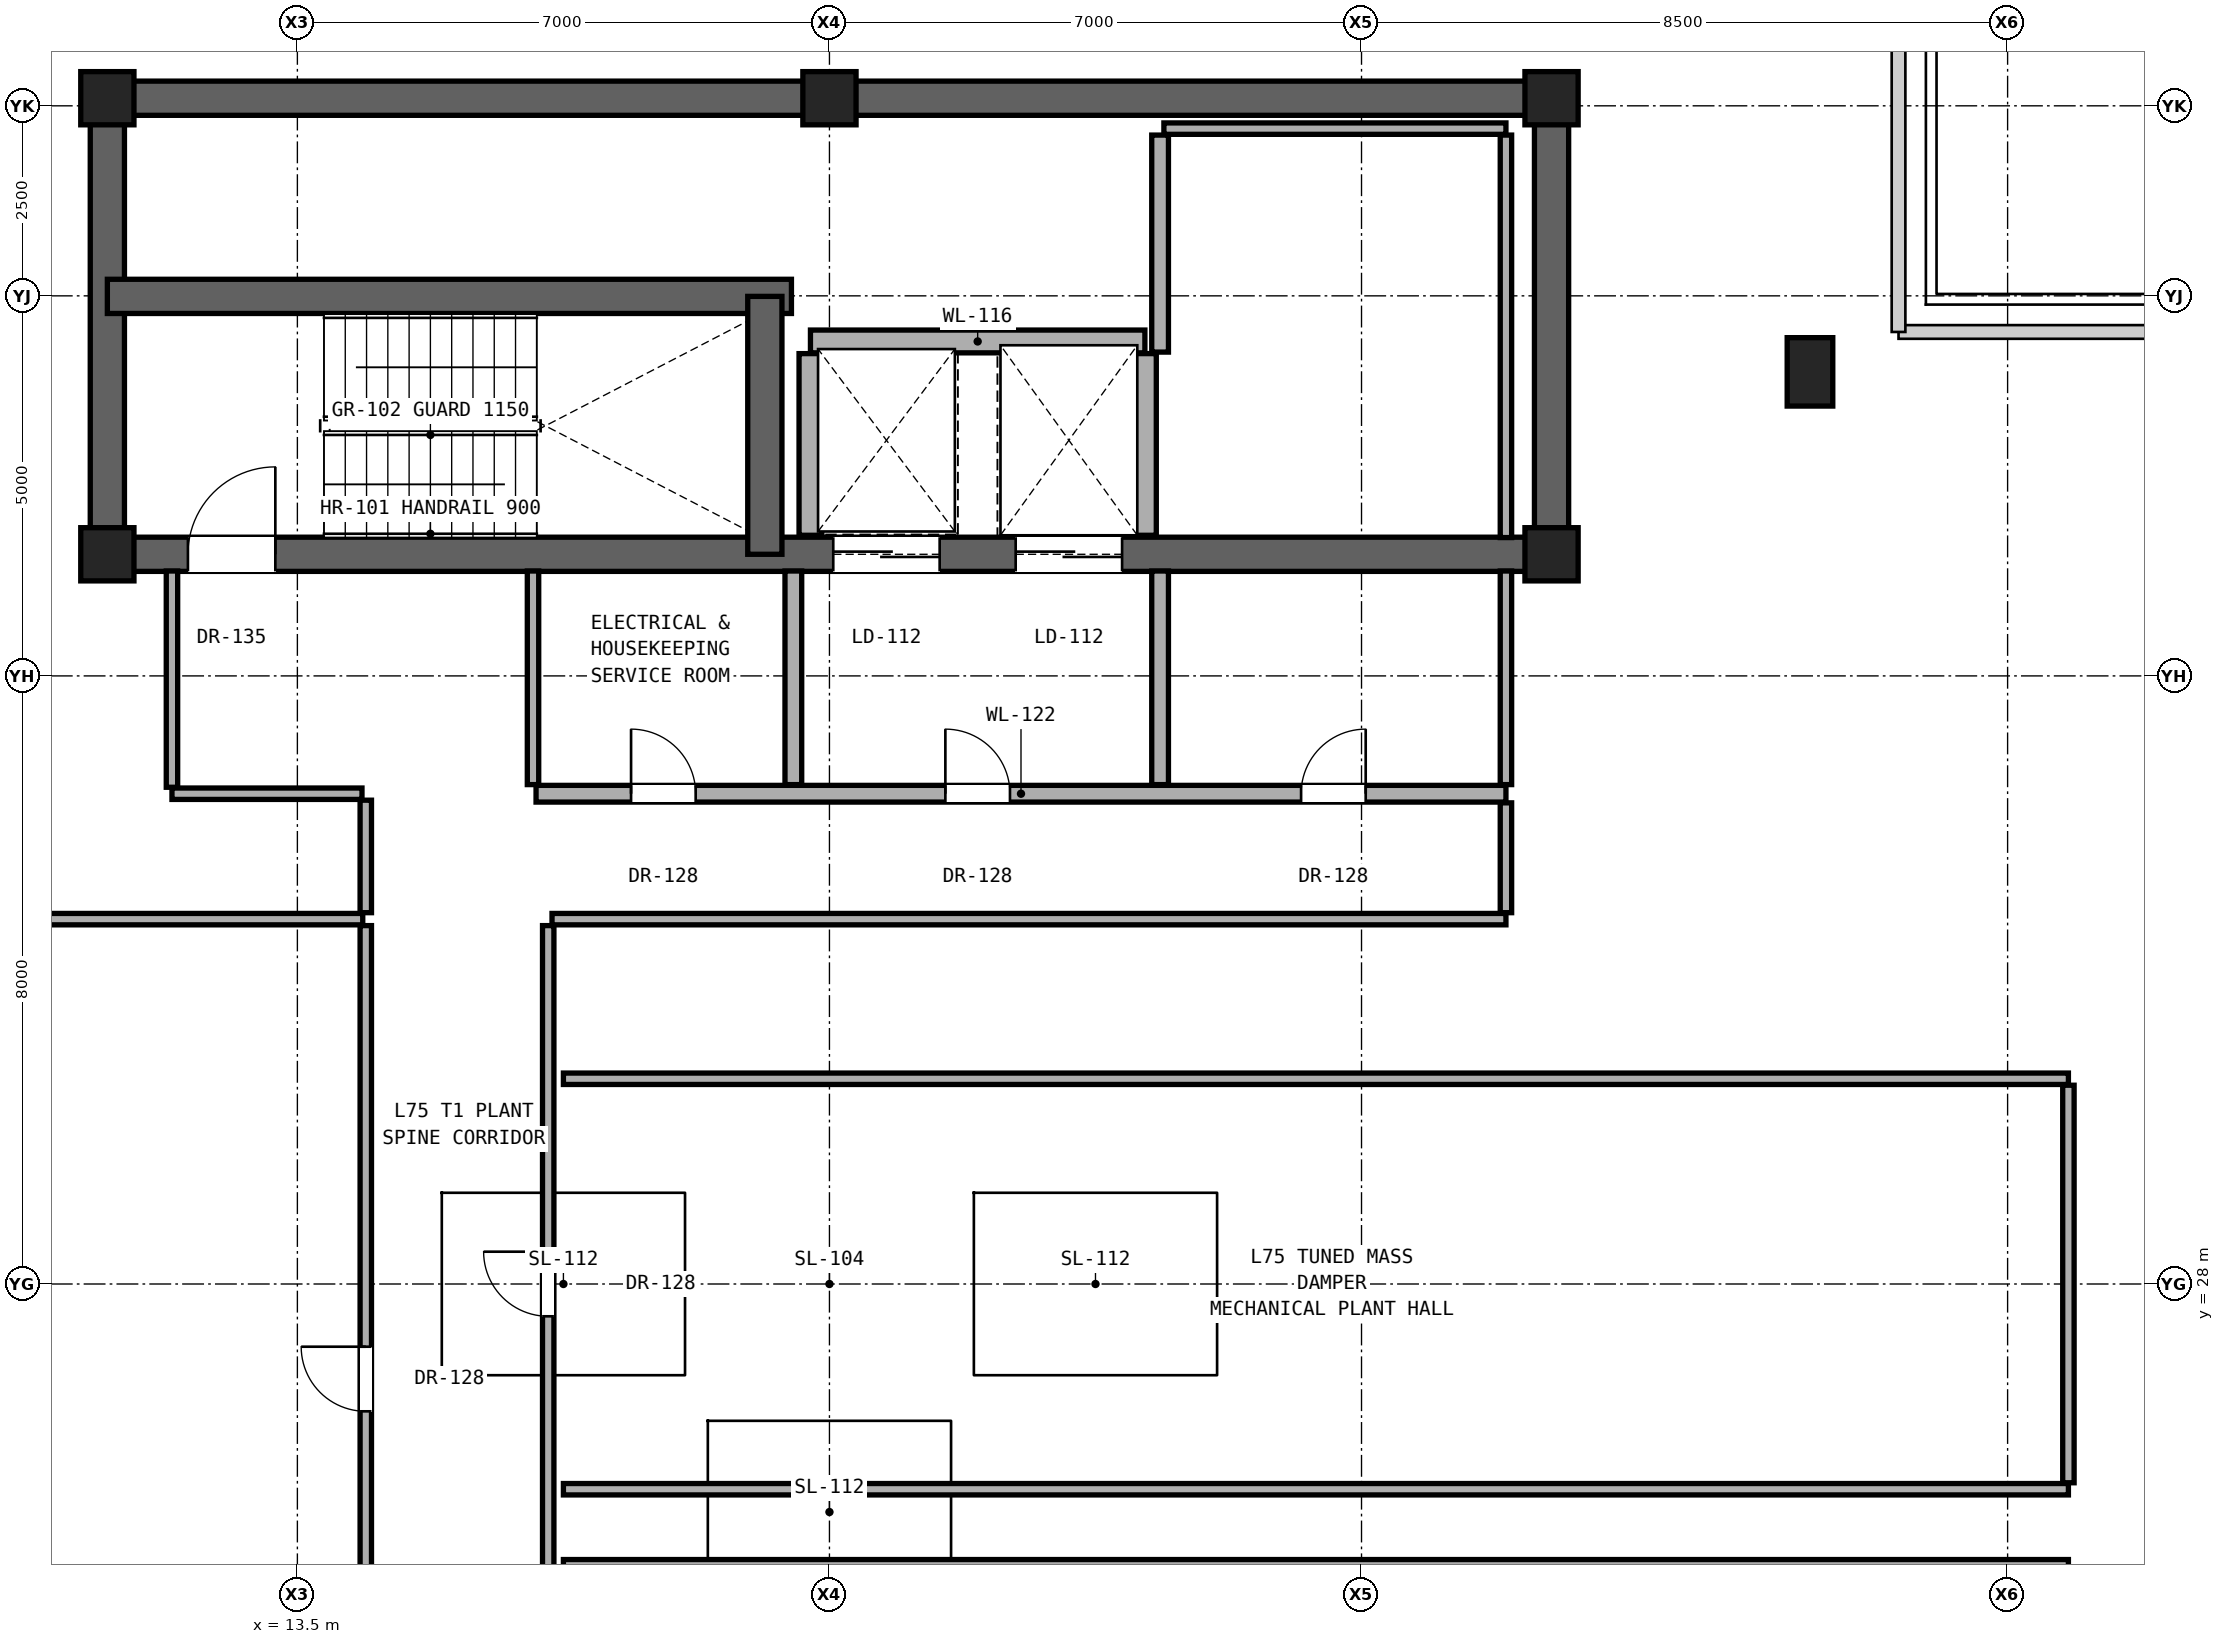
"""IFC4 building model, lengths in metres.
Left out: names, types, materials, properties, quantities, classifications, styles, units other than length and angle.
Written with IfcOpenShell. Run it as: python <this file> out.ifc"""

import sys

from ifc_helpers import new_model, si_unit, direction, frame, frame_2d, origin, origin_2d, place, context, subcontext, project, spatial, rectangle, extrude, element, fill, save


model = new_model("IFC4")
c1 = context("Model", 3, precision=1e-05, world=origin(), true_north=direction((0.0, 1.0)))
c2 = subcontext(c1, "Body", "Model", "MODEL_VIEW")
j1 = project(units=[si_unit("LENGTHUNIT", "METRE"), si_unit("PLANEANGLEUNIT", "RADIAN")], contexts=[c1])
p1 = place(None, origin())
s1 = spatial("IfcSite", under=j1, at=p1, CompositionType="ELEMENT")
p2 = place(p1, origin())
s2 = spatial("IfcBuilding", under=s1, at=p2, CompositionType="ELEMENT")
p3 = place(p2, frame((0.0, 0.0, 263.5)))
s3 = spatial("IfcBuildingStorey", under=s2, at=p3, CompositionType="ELEMENT", Elevation=263.5)
for number, where, z_axis, x_axis in (
    (1, (11.0, 37.6, 0.0), (0.0, 0.0, 1.0), (1.0, 0.0, 0.0)),
    (2, (30.0, 37.6, 0.0), (0.0, 0.0, 1.0), (1.0, 0.0, 0.0)),
    (3, (11.0, 43.6, 0.0), (0.0, 0.0, 1.0), (1.0, 0.0, 0.0)),
    (4, (20.5, 43.6, 0.0), (0.0, 0.0, 1.0), (1.0, 0.0, 0.0)),
    (5, (30.0, 43.6, 0.0), (0.0, 0.0, 1.0), (1.0, 0.0, 0.0)),
):
    element("IfcColumn", number, at=place(p3, frame(where, z_axis=z_axis, x_axis=x_axis)), inside=s3, PredefinedType="COLUMN", context=c2, shape_type="SweptSolid", body=[
        extrude(rectangle(XDim=0.7, YDim=0.7, at=origin_2d()), origin(), (0.0, 0.0, 1.0), 2.6),
    ])
p4 = place(p3, frame((33.4, 40.0, 0.0), z_axis=(0.0, 0.0, 1.0), x_axis=(1.0, 0.0, 0.0)))
e6 = element("IfcColumn", 6, at=p4, inside=s3, PredefinedType="PILASTER", context=c2, shape_type="SweptSolid", body=[
    extrude(rectangle(XDim=0.6, YDim=0.9, at=origin_2d()), origin(), (0.0, 0.0, 1.0), 2.6),
])
p5 = place(p3, frame((11.0, 43.6, 0.0), z_axis=(0.0, 0.0, 1.0), x_axis=(1.0, 0.0, 0.0)))
e7 = element("IfcWall", 7, at=p5, inside=s3, PredefinedType="SHEAR", context=c2, shape_type="SweptSolid", body=[
    extrude(rectangle(XDim=19.0, YDim=0.45, at=frame_2d((9.5, 0.0))), origin(), (0.0, 0.0, 1.0), 2.38),
])
for number, where, z_axis, x_axis in (
    (8, (11.0, 37.6, 0.0), (0.0, 0.0, 1.0), (0.0, 1.0, 0.0)),
    (9, (30.0, 37.6, 0.0), (0.0, 0.0, 1.0), (0.0, 1.0, 0.0)),
):
    element("IfcWall", number, at=place(p3, frame(where, z_axis=z_axis, x_axis=x_axis)), inside=s3, PredefinedType="SHEAR", context=c2, shape_type="SweptSolid", body=[
        extrude(rectangle(XDim=6.0, YDim=0.45, at=frame_2d((3.0, 0.0))), origin(), (0.0, 0.0, 1.0), 2.38),
    ])
p6 = place(p3, frame((11.0, 37.6, 0.0), z_axis=(0.0, 0.0, 1.0), x_axis=(1.0, 0.0, 0.0)))
e10 = element("IfcWall", 10, at=p6, inside=s3, PredefinedType="SHEAR", context=c2, shape_type="SweptSolid", body=[
    extrude(rectangle(XDim=19.0, YDim=0.45, at=frame_2d((9.5, 0.0))), origin(), (0.0, 0.0, 1.0), 2.38),
])
p7 = place(p6, frame((1.06, 0.0, 0.0)))
e11 = element("IfcOpeningElement", 11, at=p7, cuts=e10, PredefinedType="OPENING", context=c2, shape_type="SweptSolid", body=[
    extrude(rectangle(XDim=1.15, YDim=2.2, at=frame_2d((0.575, 1.1))), frame((0.0, 0.235, 0.0), z_axis=(0.0, -1.0, 0.0), x_axis=(1.0, 0.0, 0.0)), (0.0, 0.0, 1.0), 0.47),
])
p8 = place(p6, frame((9.55, 0.0, 0.0)))
e12 = element("IfcOpeningElement", 12, at=p8, cuts=e10, PredefinedType="OPENING", context=c2, shape_type="SweptSolid", body=[
    extrude(rectangle(XDim=1.4, YDim=2.35, at=frame_2d((0.7, 1.175))), frame((0.0, 0.235, 0.0), z_axis=(0.0, -1.0, 0.0), x_axis=(1.0, 0.0, 0.0)), (0.0, 0.0, 1.0), 0.47),
])
p9 = place(p6, frame((11.95, 0.0, 0.0)))
e13 = element("IfcOpeningElement", 13, at=p9, cuts=e10, PredefinedType="OPENING", context=c2, shape_type="SweptSolid", body=[
    extrude(rectangle(XDim=1.4, YDim=2.35, at=frame_2d((0.7, 1.175))), frame((0.0, 0.235, 0.0), z_axis=(0.0, -1.0, 0.0), x_axis=(1.0, 0.0, 0.0)), (0.0, 0.0, 1.0), 0.47),
])
p10 = place(p3, frame((11.0, 40.993, 0.0), z_axis=(0.0, 0.0, 1.0), x_axis=(1.0, 0.0, 0.0)))
e14 = element("IfcWall", 14, at=p10, inside=s3, PredefinedType="SHEAR", context=c2, shape_type="SweptSolid", body=[
    extrude(rectangle(XDim=9.0, YDim=0.45, at=frame_2d((4.5, 0.0))), origin(), (0.0, 0.0, 1.0), 2.38),
])
p11 = place(p3, frame((19.65, 37.6, 0.0), z_axis=(0.0, 0.0, 1.0), x_axis=(0.0, 1.0, 0.0)))
e15 = element("IfcWall", 15, at=p11, inside=s3, PredefinedType="SHEAR", context=c2, shape_type="SweptSolid", body=[
    extrude(rectangle(XDim=3.393, YDim=0.45, at=frame_2d((1.696, 0.0))), origin(), (0.0, 0.0, 1.0), 2.38),
])
for number, where, z_axis, x_axis in (
    (16, (17.0, 24.3, 0.0), (0.0, 0.0, 1.0), (1.0, 0.0, 0.0)),
    (17, (17.0, 25.3, 0.0), (0.0, 0.0, 1.0), (1.0, 0.0, 0.0)),
    (18, (17.0, 30.7, 0.0), (0.0, 0.0, 1.0), (1.0, 0.0, 0.0)),
):
    element("IfcWall", number, at=place(p3, frame(where, z_axis=z_axis, x_axis=x_axis)), inside=s3, PredefinedType="PARTITIONING", context=c2, shape_type="SweptSolid", body=[
        extrude(rectangle(XDim=19.8, YDim=0.15, at=frame_2d((9.9, 0.0))), origin(), (0.0, 0.0, 1.0), 2.042),
    ])
p12 = place(p3, frame((3.2, 32.8, 0.0), z_axis=(0.0, 0.0, 1.0), x_axis=(1.0, 0.0, 0.0)))
e19 = element("IfcWall", 19, at=p12, inside=s3, PredefinedType="PARTITIONING", context=c2, shape_type="SweptSolid", body=[
    extrude(rectangle(XDim=11.16, YDim=0.15, at=frame_2d((5.58, 0.0))), origin(), (0.0, 0.0, 1.0), 2.042),
])
p13 = place(p3, frame((16.85, 32.8, 0.0), z_axis=(0.0, 0.0, 1.0), x_axis=(1.0, 0.0, 0.0)))
e20 = element("IfcWall", 20, at=p13, inside=s3, PredefinedType="PARTITIONING", context=c2, shape_type="SweptSolid", body=[
    extrude(rectangle(XDim=12.55, YDim=0.15, at=frame_2d((6.275, 0.0))), origin(), (0.0, 0.0, 1.0), 2.042),
])
p14 = place(p3, frame((11.85, 34.45, 0.0), z_axis=(0.0, 0.0, 1.0), x_axis=(1.0, 0.0, 0.0)))
e21 = element("IfcWall", 21, at=p14, inside=s3, PredefinedType="PARTITIONING", context=c2, shape_type="SweptSolid", body=[
    extrude(rectangle(XDim=2.5, YDim=0.15, at=frame_2d((1.25, 0.0))), origin(), (0.0, 0.0, 1.0), 2.38),
])
p15 = place(p3, frame((16.64, 34.45, 0.0), z_axis=(0.0, 0.0, 1.0), x_axis=(1.0, 0.0, 0.0)))
e22 = element("IfcWall", 22, at=p15, inside=s3, PredefinedType="SOLIDWALL", context=c2, shape_type="SweptSolid", body=[
    extrude(rectangle(XDim=12.76, YDim=0.22, at=frame_2d((6.38, 0.0))), origin(), (0.0, 0.0, 1.0), 2.042),
])
p16 = place(p15, frame((5.385, 0.0, 0.0)))
e23 = element("IfcOpeningElement", 23, at=p16, cuts=e22, PredefinedType="OPENING", context=c2, shape_type="SweptSolid", body=[
    extrude(rectangle(XDim=0.85, YDim=2.01, at=frame_2d((0.425, 1.005))), frame((0.0, 0.12, 0.0), z_axis=(0.0, -1.0, 0.0), x_axis=(1.0, 0.0, 0.0)), (0.0, 0.0, 1.0), 0.24),
])
p17 = place(p15, frame((10.065, 0.0, 0.0)))
e24 = element("IfcOpeningElement", 24, at=p17, cuts=e22, PredefinedType="OPENING", context=c2, shape_type="SweptSolid", body=[
    extrude(rectangle(XDim=0.85, YDim=2.01, at=frame_2d((0.425, 1.005))), frame((0.0, 0.12, 0.0), z_axis=(0.0, -1.0, 0.0), x_axis=(1.0, 0.0, 0.0)), (0.0, 0.0, 1.0), 0.24),
])
p18 = place(p15, frame((1.25, 0.0, 0.0)))
e25 = element("IfcOpeningElement", 25, at=p18, cuts=e22, PredefinedType="OPENING", context=c2, shape_type="SweptSolid", body=[
    extrude(rectangle(XDim=0.85, YDim=2.01, at=frame_2d((0.425, 1.005))), frame((0.0, 0.12, 0.0), z_axis=(0.0, -1.0, 0.0), x_axis=(1.0, 0.0, 0.0)), (0.0, 0.0, 1.0), 0.24),
])
p19 = place(p3, frame((20.25, 40.4, 0.0), z_axis=(0.0, 0.0, 1.0), x_axis=(1.0, 0.0, 0.0)))
e26 = element("IfcWall", 26, at=p19, inside=s3, PredefinedType="SOLIDWALL", context=c2, shape_type="SweptSolid", body=[
    extrude(rectangle(XDim=4.4, YDim=0.3, at=frame_2d((2.2, 0.0))), origin(), (0.0, 0.0, 1.0), 2.38),
])
p20 = place(p3, frame((24.9, 43.2, 0.0), z_axis=(0.0, 0.0, 1.0), x_axis=(1.0, 0.0, 0.0)))
e27 = element("IfcWall", 27, at=p20, inside=s3, PredefinedType="PARTITIONING", context=c2, shape_type="SweptSolid", body=[
    extrude(rectangle(XDim=4.5, YDim=0.15, at=frame_2d((2.25, 0.0))), origin(), (0.0, 0.0, 1.0), 2.38),
])
p21 = place(p3, frame((11.85, 34.535, 0.0), z_axis=(0.0, 0.0, 1.0), x_axis=(0.0, 1.0, 0.0)))
e28 = element("IfcWall", 28, at=p21, inside=s3, PredefinedType="PARTITIONING", context=c2, shape_type="SweptSolid", body=[
    extrude(rectangle(XDim=2.845, YDim=0.15, at=frame_2d((1.422, 0.0))), origin(), (0.0, 0.0, 1.0), 2.38),
])
p22 = place(p3, frame((14.4, 20.785, 0.0), z_axis=(0.0, 0.0, 1.0), x_axis=(0.0, 1.0, 0.0)))
e29 = element("IfcWall", 29, at=p22, inside=s3, PredefinedType="PARTITIONING", context=c2, shape_type="SweptSolid", body=[
    extrude(rectangle(XDim=11.93, YDim=0.15, at=frame_2d((5.965, 0.0))), origin(), (0.0, 0.0, 1.0), 2.042),
])
p23 = place(p22, frame((5.54, 0.0, 0.0)))
e30 = element("IfcOpeningElement", 30, at=p23, cuts=e29, PredefinedType="OPENING", context=c2, shape_type="SweptSolid", body=[
    extrude(rectangle(XDim=0.85, YDim=2.01, at=frame_2d((0.425, 1.005))), frame((0.0, 0.085, 0.0), z_axis=(0.0, -1.0, 0.0), x_axis=(1.0, 0.0, 0.0)), (0.0, 0.0, 1.0), 0.17),
])
p24 = place(p3, frame((14.4, 32.885, 0.0), z_axis=(0.0, 0.0, 1.0), x_axis=(0.0, 1.0, 0.0)))
e31 = element("IfcWall", 31, at=p24, inside=s3, PredefinedType="PARTITIONING", context=c2, shape_type="SweptSolid", body=[
    extrude(rectangle(XDim=1.48, YDim=0.15, at=frame_2d((0.74, 0.0))), origin(), (0.0, 0.0, 1.0), 2.38),
])
p25 = place(p3, frame((16.6, 34.57, 0.0), z_axis=(0.0, 0.0, 1.0), x_axis=(0.0, 1.0, 0.0)))
e32 = element("IfcWall", 32, at=p25, inside=s3, PredefinedType="PARTITIONING", context=c2, shape_type="SweptSolid", body=[
    extrude(rectangle(XDim=2.81, YDim=0.15, at=frame_2d((1.405, 0.0))), origin(), (0.0, 0.0, 1.0), 2.38),
])
p26 = place(p3, frame((16.8, 20.785, 0.0), z_axis=(0.0, 0.0, 1.0), x_axis=(0.0, 1.0, 0.0)))
e33 = element("IfcWall", 33, at=p26, inside=s3, PredefinedType="PARTITIONING", context=c2, shape_type="SweptSolid", body=[
    extrude(rectangle(XDim=11.93, YDim=0.15, at=frame_2d((5.965, 0.0))), origin(), (0.0, 0.0, 1.0), 2.042),
])
p27 = place(p26, frame((6.79, 0.0, 0.0)))
e34 = element("IfcOpeningElement", 34, at=p27, cuts=e33, PredefinedType="OPENING", context=c2, shape_type="SweptSolid", body=[
    extrude(rectangle(XDim=0.85, YDim=2.01, at=frame_2d((0.425, 1.005))), frame((0.0, 0.085, 0.0), z_axis=(0.0, -1.0, 0.0), x_axis=(1.0, 0.0, 0.0)), (0.0, 0.0, 1.0), 0.17),
])
p28 = place(p26, frame((1.39, 0.0, 0.0)))
e35 = element("IfcOpeningElement", 35, at=p28, cuts=e33, PredefinedType="OPENING", context=c2, shape_type="SweptSolid", body=[
    extrude(rectangle(XDim=0.85, YDim=2.01, at=frame_2d((0.425, 1.005))), frame((0.0, 0.085, 0.0), z_axis=(0.0, -1.0, 0.0), x_axis=(1.0, 0.0, 0.0)), (0.0, 0.0, 1.0), 0.17),
])
p29 = place(p3, frame((20.025, 34.57, 0.0), z_axis=(0.0, 0.0, 1.0), x_axis=(0.0, 1.0, 0.0)))
e36 = element("IfcWall", 36, at=p29, inside=s3, PredefinedType="SOLIDWALL", context=c2, shape_type="SweptSolid", body=[
    extrude(rectangle(XDim=2.81, YDim=0.22, at=frame_2d((1.405, 0.0))), origin(), (0.0, 0.0, 1.0), 2.38),
])
for number, where, z_axis, x_axis in (
    (37, (20.25, 37.85, 0.0), (0.0, 0.0, 1.0), (0.0, 1.0, 0.0)),
    (38, (24.65, 37.85, 0.0), (0.0, 0.0, 1.0), (0.0, 1.0, 0.0)),
):
    element("IfcWall", number, at=place(p3, frame(where, z_axis=z_axis, x_axis=x_axis)), inside=s3, PredefinedType="SOLIDWALL", context=c2, shape_type="SweptSolid", body=[
        extrude(rectangle(XDim=2.39, YDim=0.3, at=frame_2d((1.195, 0.0))), origin(), (0.0, 0.0, 1.0), 2.38),
    ])
p30 = place(p3, frame((24.85, 34.57, 0.0), z_axis=(0.0, 0.0, 1.0), x_axis=(0.0, 1.0, 0.0)))
e39 = element("IfcWall", 39, at=p30, inside=s3, PredefinedType="SOLIDWALL", context=c2, shape_type="SweptSolid", body=[
    extrude(rectangle(XDim=2.81, YDim=0.22, at=frame_2d((1.405, 0.0))), origin(), (0.0, 0.0, 1.0), 2.38),
])
p31 = place(p3, frame((24.85, 40.26, 0.0), z_axis=(0.0, 0.0, 1.0), x_axis=(0.0, 1.0, 0.0)))
e40 = element("IfcWall", 40, at=p31, inside=s3, PredefinedType="SOLIDWALL", context=c2, shape_type="SweptSolid", body=[
    extrude(rectangle(XDim=2.855, YDim=0.22, at=frame_2d((1.427, 0.0))), origin(), (0.0, 0.0, 1.0), 2.38),
])
p32 = place(p3, frame((29.4, 32.885, 0.0), z_axis=(0.0, 0.0, 1.0), x_axis=(0.0, 1.0, 0.0)))
e41 = element("IfcWall", 41, at=p32, inside=s3, PredefinedType="PARTITIONING", context=c2, shape_type="SweptSolid", body=[
    extrude(rectangle(XDim=1.445, YDim=0.15, at=frame_2d((0.723, 0.0))), origin(), (0.0, 0.0, 1.0), 2.38),
])
p33 = place(p3, frame((29.4, 34.57, 0.0), z_axis=(0.0, 0.0, 1.0), x_axis=(0.0, 1.0, 0.0)))
e42 = element("IfcWall", 42, at=p33, inside=s3, PredefinedType="PARTITIONING", context=c2, shape_type="SweptSolid", body=[
    extrude(rectangle(XDim=2.81, YDim=0.15, at=frame_2d((1.405, 0.0))), origin(), (0.0, 0.0, 1.0), 2.38),
])
p34 = place(p3, frame((29.4, 37.82, 0.0), z_axis=(0.0, 0.0, 1.0), x_axis=(0.0, 1.0, 0.0)))
e43 = element("IfcWall", 43, at=p34, inside=s3, PredefinedType="PARTITIONING", context=c2, shape_type="SweptSolid", body=[
    extrude(rectangle(XDim=5.295, YDim=0.15, at=frame_2d((2.647, 0.0))), origin(), (0.0, 0.0, 1.0), 2.38),
])
p35 = place(p3, frame((36.8, 25.385, 0.0), z_axis=(0.0, 0.0, 1.0), x_axis=(0.0, 1.0, 0.0)))
e44 = element("IfcWall", 44, at=p35, inside=s3, PredefinedType="PARTITIONING", context=c2, shape_type="SweptSolid", body=[
    extrude(rectangle(XDim=5.23, YDim=0.15, at=frame_2d((2.615, 0.0))), origin(), (0.0, 0.0, 1.0), 2.38),
])
p36 = place(p7, origin())
e45 = element("IfcDoor", 45, at=p36, inside=s3, OperationType="SINGLE_SWING_RIGHT", PredefinedType="DOOR", context=c2, shape_type="SweptSolid", body=[
    extrude(rectangle(XDim=1.15, YDim=2.2, at=frame_2d((0.575, 1.1))), frame((0.0, 0.025, 0.0), z_axis=(0.0, -1.0, 0.0), x_axis=(1.0, 0.0, 0.0)), (0.0, 0.0, 1.0), 0.05),
])
fill(e11, e45)
p37 = place(p16, origin())
e46 = element("IfcDoor", 46, at=p37, inside=s3, OperationType="SINGLE_SWING_LEFT", PredefinedType="DOOR", context=c2, shape_type="SweptSolid", body=[
    extrude(rectangle(XDim=0.85, YDim=2.01, at=frame_2d((0.425, 1.005))), frame((0.0, 0.025, 0.0), z_axis=(0.0, -1.0, 0.0), x_axis=(1.0, 0.0, 0.0)), (0.0, 0.0, 1.0), 0.05),
])
fill(e23, e46)
p38 = place(p17, origin())
e47 = element("IfcDoor", 47, at=p38, inside=s3, OperationType="SINGLE_SWING_RIGHT", PredefinedType="DOOR", context=c2, shape_type="SweptSolid", body=[
    extrude(rectangle(XDim=0.85, YDim=2.01, at=frame_2d((0.425, 1.005))), frame((0.0, 0.025, 0.0), z_axis=(0.0, -1.0, 0.0), x_axis=(1.0, 0.0, 0.0)), (0.0, 0.0, 1.0), 0.05),
])
fill(e24, e47)
p39 = place(p18, origin())
e48 = element("IfcDoor", 48, at=p39, inside=s3, OperationType="SINGLE_SWING_LEFT", PredefinedType="DOOR", context=c2, shape_type="SweptSolid", body=[
    extrude(rectangle(XDim=0.85, YDim=2.01, at=frame_2d((0.425, 1.005))), frame((0.0, 0.025, 0.0), z_axis=(0.0, -1.0, 0.0), x_axis=(1.0, 0.0, 0.0)), (0.0, 0.0, 1.0), 0.05),
])
fill(e25, e48)
p40 = place(p27, origin())
e49 = element("IfcDoor", 49, at=p40, inside=s3, OperationType="SINGLE_SWING_RIGHT", PredefinedType="DOOR", context=c2, shape_type="SweptSolid", body=[
    extrude(rectangle(XDim=0.85, YDim=2.01, at=frame_2d((0.425, 1.005))), frame((0.0, 0.025, 0.0), z_axis=(0.0, -1.0, 0.0), x_axis=(1.0, 0.0, 0.0)), (0.0, 0.0, 1.0), 0.05),
])
fill(e34, e49)
p41 = place(p23, origin())
e50 = element("IfcDoor", 50, at=p41, inside=s3, OperationType="SINGLE_SWING_RIGHT", PredefinedType="DOOR", context=c2, shape_type="SweptSolid", body=[
    extrude(rectangle(XDim=0.85, YDim=2.01, at=frame_2d((0.425, 1.005))), frame((0.0, 0.025, 0.0), z_axis=(0.0, -1.0, 0.0), x_axis=(1.0, 0.0, 0.0)), (0.0, 0.0, 1.0), 0.05),
])
fill(e30, e50)
p42 = place(p8, origin())
e51 = element("IfcDoor", 51, at=p42, inside=s3, OperationType="DOUBLE_DOOR_SLIDING", PredefinedType="DOOR", context=c2, shape_type="SweptSolid", body=[
    extrude(rectangle(XDim=1.4, YDim=2.35, at=frame_2d((0.7, 1.175))), frame((0.0, 0.025, 0.0), z_axis=(0.0, -1.0, 0.0), x_axis=(1.0, 0.0, 0.0)), (0.0, 0.0, 1.0), 0.05),
])
fill(e12, e51)
p43 = place(p9, origin())
e52 = element("IfcDoor", 52, at=p43, inside=s3, OperationType="DOUBLE_DOOR_SLIDING", PredefinedType="DOOR", context=c2, shape_type="SweptSolid", body=[
    extrude(rectangle(XDim=1.4, YDim=2.35, at=frame_2d((0.7, 1.175))), frame((0.0, 0.025, 0.0), z_axis=(0.0, -1.0, 0.0), x_axis=(1.0, 0.0, 0.0)), (0.0, 0.0, 1.0), 0.05),
])
fill(e13, e52)
save(model, sys.argv[1])
